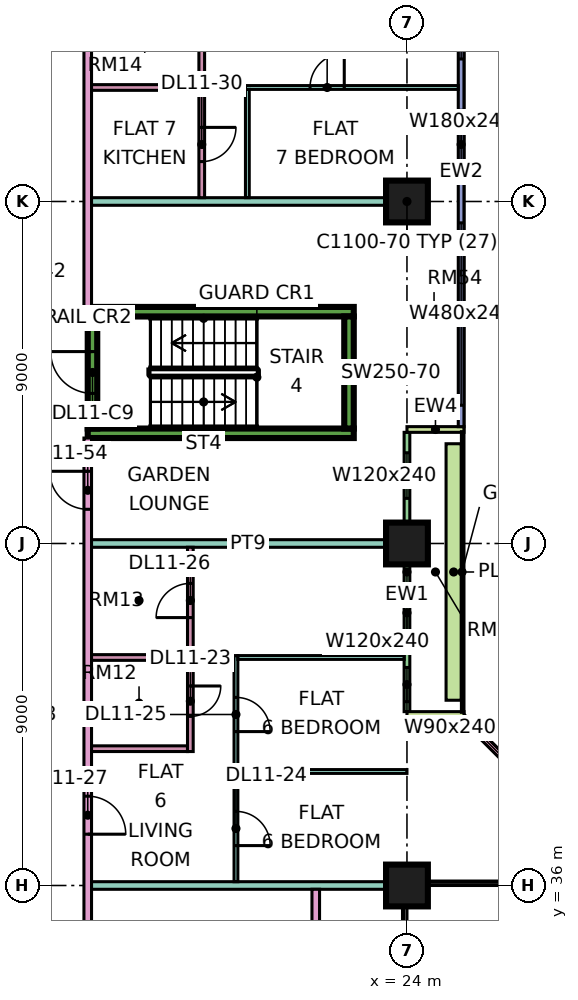
"""IFC4 building model, lengths in metres.
Left out: names, types, materials, properties, quantities, classifications, styles, units other than length and angle.
Written with IfcOpenShell. Run it as: python <this file> out.ifc"""

import sys

from ifc_helpers import new_model, si_unit, direction, frame, frame_2d, origin, origin_2d, place, context, subcontext, project, spatial, rectangle, extrude, element, fill, save


model = new_model("IFC4")
c1 = context("Model", 3, precision=1e-05, world=origin(), true_north=direction((0.0, 1.0)))
c2 = subcontext(c1, "Body", "Model", "MODEL_VIEW")
j1 = project(units=[si_unit("LENGTHUNIT", "METRE"), si_unit("PLANEANGLEUNIT", "RADIAN")], contexts=[c1])
p1 = place(None, origin())
s1 = spatial("IfcSite", under=j1, at=p1, CompositionType="ELEMENT")
p2 = place(p1, origin())
s2 = spatial("IfcBuilding", under=s1, at=p2, CompositionType="ELEMENT")
p3 = place(p2, frame((0.0, 0.0, 56.4)))
s3 = spatial("IfcBuildingStorey", under=s2, at=p3, CompositionType="ELEMENT", Elevation=56.4)
for number, where, z_axis, x_axis in (
    (1, (24.0, 36.0, 0.0), (0.0, 0.0, 1.0), (1.0, 0.0, 0.0)),
    (2, (24.0, 45.0, 0.0), (0.0, 0.0, 1.0), (1.0, 0.0, 0.0)),
    (3, (24.0, 54.0, 0.0), (0.0, 0.0, 1.0), (1.0, 0.0, 0.0)),
):
    element("IfcColumn", number, at=place(p3, frame(where, z_axis=z_axis, x_axis=x_axis)), inside=s3, PredefinedType="COLUMN", context=c2, shape_type="SweptSolid", body=[
        extrude(rectangle(XDim=1.1, YDim=1.1, at=origin_2d()), origin(), (0.0, 0.0, 1.0), 3.75),
    ])
for number, where, z_axis, x_axis in (
    (4, (15.6, 47.9, 0.0), (0.0, 0.0, 1.0), (1.0, 0.0, 0.0)),
    (5, (15.6, 51.1, 0.0), (0.0, 0.0, 1.0), (1.0, 0.0, 0.0)),
):
    element("IfcWall", number, at=place(p3, frame(where, z_axis=z_axis, x_axis=x_axis)), inside=s3, PredefinedType="SHEAR", context=c2, shape_type="SweptSolid", body=[
        extrude(rectangle(XDim=7.0, YDim=0.25, at=frame_2d((3.5, 0.0))), origin(), (0.0, 0.0, 1.0), 3.75),
    ])
p4 = place(p3, frame((15.725, 48.025, 0.0), z_axis=(0.0, 0.0, 1.0), x_axis=(0.0, 1.0, 0.0)))
e6 = element("IfcWall", 6, at=p4, inside=s3, PredefinedType="SHEAR", context=c2, shape_type="SweptSolid", body=[
    extrude(rectangle(XDim=2.95, YDim=0.25, at=frame_2d((1.475, 0.0))), origin(), (0.0, 0.0, 1.0), 3.75),
])
p5 = place(p4, frame((0.925, 0.0, 0.0)))
e7 = element("IfcOpeningElement", 7, at=p5, cuts=e6, PredefinedType="OPENING", context=c2, shape_type="SweptSolid", body=[
    extrude(rectangle(XDim=1.1, YDim=2.2, at=frame_2d((0.55, 1.1))), frame((0.0, 0.135, 0.0), z_axis=(0.0, -1.0, 0.0), x_axis=(1.0, 0.0, 0.0)), (0.0, 0.0, 1.0), 0.27),
])
p6 = place(p3, frame((22.475, 48.025, 0.0), z_axis=(0.0, 0.0, 1.0), x_axis=(0.0, 1.0, 0.0)))
e8 = element("IfcWall", 8, at=p6, inside=s3, PredefinedType="SHEAR", context=c2, shape_type="SweptSolid", body=[
    extrude(rectangle(XDim=2.95, YDim=0.25, at=frame_2d((1.475, 0.0))), origin(), (0.0, 0.0, 1.0), 3.75),
])
p7 = place(p3, frame((28.447, 37.447, 0.0), z_axis=(0.0, 0.0, 1.0), x_axis=(-0.707106781187, 0.707106781187, 0.0)))
e9 = element("IfcWall", 9, at=p7, inside=s3, PredefinedType="SOLIDWALL", context=c2, shape_type="SweptSolid", body=[
    extrude(rectangle(XDim=4.243, YDim=0.15, at=frame_2d((2.121, 0.0))), origin(), (0.0, 0.0, 1.0), 3.35),
])
p8 = place(p7, frame((0.621, 0.0, 0.45)))
e10 = element("IfcOpeningElement", 10, at=p8, cuts=e9, PredefinedType="OPENING", context=c2, shape_type="SweptSolid", body=[
    extrude(rectangle(XDim=3.0, YDim=2.4, at=frame_2d((1.5, 1.2))), frame((0.0, 0.085, 0.0), z_axis=(0.0, -1.0, 0.0), x_axis=(1.0, 0.0, 0.0)), (0.0, 0.0, 1.0), 0.17),
])
p9 = place(p3, frame((24.0, 40.575, 0.0), z_axis=(0.0, 0.0, 1.0), x_axis=(0.0, 1.0, 0.0)))
e11 = element("IfcWall", 11, at=p9, inside=s3, PredefinedType="SOLIDWALL", context=c2, shape_type="SweptSolid", body=[
    extrude(rectangle(XDim=7.35, YDim=0.15, at=frame_2d((3.675, 0.0))), origin(), (0.0, 0.0, 1.0), 3.35),
])
p10 = place(p9, frame((0.262, 0.0, 0.45)))
e12 = element("IfcOpeningElement", 12, at=p10, cuts=e11, PredefinedType="OPENING", context=c2, shape_type="SweptSolid", body=[
    extrude(rectangle(XDim=0.9, YDim=2.4, at=frame_2d((0.45, 1.2))), frame((0.0, 0.085, 0.0), z_axis=(0.0, -1.0, 0.0), x_axis=(1.0, 0.0, 0.0)), (0.0, 0.0, 1.0), 0.17),
])
p11 = place(p9, frame((2.0, 0.0, 0.45)))
e13 = element("IfcOpeningElement", 13, at=p11, cuts=e11, PredefinedType="OPENING", context=c2, shape_type="SweptSolid", body=[
    extrude(rectangle(XDim=1.2, YDim=2.4, at=frame_2d((0.6, 1.2))), frame((0.0, 0.085, 0.0), z_axis=(0.0, -1.0, 0.0), x_axis=(1.0, 0.0, 0.0)), (0.0, 0.0, 1.0), 0.17),
])
p12 = place(p9, frame((5.613, 0.0, 0.45)))
e14 = element("IfcOpeningElement", 14, at=p12, cuts=e11, PredefinedType="OPENING", context=c2, shape_type="SweptSolid", body=[
    extrude(rectangle(XDim=1.2, YDim=2.4, at=frame_2d((0.6, 1.2))), frame((0.0, 0.085, 0.0), z_axis=(0.0, -1.0, 0.0), x_axis=(1.0, 0.0, 0.0)), (0.0, 0.0, 1.0), 0.17),
])
for number, where, z_axis, x_axis in (
    (15, (25.5, 40.5, 0.0), (0.0, 0.0, 1.0), (-1.0, 0.0, 0.0)),
    (16, (25.5, 48.0, 0.0), (0.0, 0.0, 1.0), (-1.0, 0.0, 0.0)),
):
    element("IfcWall", number, at=place(p3, frame(where, z_axis=z_axis, x_axis=x_axis)), inside=s3, PredefinedType="SOLIDWALL", context=c2, shape_type="SweptSolid", body=[
        extrude(rectangle(XDim=1.5, YDim=0.15, at=frame_2d((0.75, 0.0))), origin(), (0.0, 0.0, 1.0), 3.35),
    ])
p13 = place(p3, frame((25.425, 48.075, 0.0), z_axis=(0.0, 0.0, 1.0), x_axis=(0.0, 1.0, 0.0)))
e17 = element("IfcWall", 17, at=p13, inside=s3, PredefinedType="SOLIDWALL", context=c2, shape_type="SweptSolid", body=[
    extrude(rectangle(XDim=13.425, YDim=0.15, at=frame_2d((6.712, 0.0))), origin(), (0.0, 0.0, 1.0), 3.35),
])
p14 = place(p13, frame((0.562, 0.0, 0.45)))
e18 = element("IfcOpeningElement", 18, at=p14, cuts=e17, PredefinedType="OPENING", context=c2, shape_type="SweptSolid", body=[
    extrude(rectangle(XDim=4.8, YDim=2.4, at=frame_2d((2.4, 1.2))), frame((0.0, 0.085, 0.0), z_axis=(0.0, -1.0, 0.0), x_axis=(1.0, 0.0, 0.0)), (0.0, 0.0, 1.0), 0.17),
])
p15 = place(p13, frame((6.525, 0.0, 0.45)))
e19 = element("IfcOpeningElement", 19, at=p15, cuts=e17, PredefinedType="OPENING", context=c2, shape_type="SweptSolid", body=[
    extrude(rectangle(XDim=1.8, YDim=2.4, at=frame_2d((0.9, 1.2))), frame((0.0, 0.085, 0.0), z_axis=(0.0, -1.0, 0.0), x_axis=(1.0, 0.0, 0.0)), (0.0, 0.0, 1.0), 0.17),
])
p16 = place(p13, frame((9.675, 0.0, 0.45)))
e20 = element("IfcOpeningElement", 20, at=p16, cuts=e17, PredefinedType="OPENING", context=c2, shape_type="SweptSolid", body=[
    extrude(rectangle(XDim=3.0, YDim=2.4, at=frame_2d((1.5, 1.2))), frame((0.0, 0.085, 0.0), z_axis=(0.0, -1.0, 0.0), x_axis=(1.0, 0.0, 0.0)), (0.0, 0.0, 1.0), 0.17),
])
p17 = place(p3, frame((25.229, 40.875, 0.0), z_axis=(0.0, 0.0, 1.0), x_axis=(0.0, 1.0, 0.0)))
e21 = element("IfcWall", 21, at=p17, inside=s3, PredefinedType="SOLIDWALL", context=c2, shape_type="SweptSolid", body=[
    extrude(rectangle(XDim=6.75, YDim=0.4, at=frame_2d((3.375, 0.0))), origin(), (0.0, 0.0, 1.0), 0.7),
])
p18 = place(p3, frame((15.6, 20.0, 0.0), z_axis=(0.0, 0.0, 1.0), x_axis=(0.0, 1.0, 0.0)))
e22 = element("IfcWall", 22, at=p18, inside=s3, PredefinedType="PARTITIONING", context=c2, shape_type="SweptSolid", body=[
    extrude(rectangle(XDim=27.775, YDim=0.2, at=frame_2d((13.887, 0.0))), origin(), (0.0, 0.0, 1.0), 3.35),
])
p19 = place(p18, frame((7.0, 0.0, 0.0)))
e23 = element("IfcOpeningElement", 23, at=p19, cuts=e22, PredefinedType="OPENING", context=c2, shape_type="SweptSolid", body=[
    extrude(rectangle(XDim=1.0, YDim=2.1, at=frame_2d((0.5, 1.05))), frame((0.0, 0.11, 0.0), z_axis=(0.0, -1.0, 0.0), x_axis=(1.0, 0.0, 0.0)), (0.0, 0.0, 1.0), 0.22),
])
p20 = place(p18, frame((12.95, 0.0, 0.0)))
e24 = element("IfcOpeningElement", 24, at=p20, cuts=e22, PredefinedType="OPENING", context=c2, shape_type="SweptSolid", body=[
    extrude(rectangle(XDim=1.0, YDim=2.1, at=frame_2d((0.5, 1.05))), frame((0.0, 0.11, 0.0), z_axis=(0.0, -1.0, 0.0), x_axis=(1.0, 0.0, 0.0)), (0.0, 0.0, 1.0), 0.22),
])
p21 = place(p18, frame((17.35, 0.0, 0.0)))
e25 = element("IfcOpeningElement", 25, at=p21, cuts=e22, PredefinedType="OPENING", context=c2, shape_type="SweptSolid", body=[
    extrude(rectangle(XDim=1.0, YDim=2.1, at=frame_2d((0.5, 1.05))), frame((0.0, 0.11, 0.0), z_axis=(0.0, -1.0, 0.0), x_axis=(1.0, 0.0, 0.0)), (0.0, 0.0, 1.0), 0.22),
])
p22 = place(p18, frame((1.15, 0.0, 0.0)))
e26 = element("IfcOpeningElement", 26, at=p22, cuts=e22, PredefinedType="OPENING", context=c2, shape_type="SweptSolid", body=[
    extrude(rectangle(XDim=1.8, YDim=2.1, at=frame_2d((0.9, 1.05))), frame((0.0, 0.11, 0.0), z_axis=(0.0, -1.0, 0.0), x_axis=(1.0, 0.0, 0.0)), (0.0, 0.0, 1.0), 0.22),
])
p23 = place(p18, frame((25.9, 0.0, 0.0)))
e27 = element("IfcOpeningElement", 27, at=p23, cuts=e22, PredefinedType="OPENING", context=c2, shape_type="SweptSolid", body=[
    extrude(rectangle(XDim=1.0, YDim=2.1, at=frame_2d((0.5, 1.05))), frame((0.0, 0.11, 0.0), z_axis=(0.0, -1.0, 0.0), x_axis=(1.0, 0.0, 0.0)), (0.0, 0.0, 1.0), 0.22),
])
p24 = place(p3, frame((15.6, 51.225, 0.0), z_axis=(0.0, 0.0, 1.0), x_axis=(0.0, 1.0, 0.0)))
e28 = element("IfcWall", 28, at=p24, inside=s3, PredefinedType="PARTITIONING", context=c2, shape_type="SweptSolid", body=[
    extrude(rectangle(XDim=11.701, YDim=0.2, at=frame_2d((5.851, 0.0))), origin(), (0.0, 0.0, 1.0), 3.35),
])
p25 = place(p24, frame((9.675, 0.0, 0.0)))
e29 = element("IfcOpeningElement", 29, at=p25, cuts=e28, PredefinedType="OPENING", context=c2, shape_type="SweptSolid", body=[
    extrude(rectangle(XDim=1.0, YDim=2.1, at=frame_2d((0.5, 1.05))), frame((0.0, 0.11, 0.0), z_axis=(0.0, -1.0, 0.0), x_axis=(1.0, 0.0, 0.0)), (0.0, 0.0, 1.0), 0.22),
])
p26 = place(p3, frame((15.7, 36.0, 0.0), z_axis=(0.0, 0.0, 1.0), x_axis=(1.0, 0.0, 0.0)))
e30 = element("IfcWall", 30, at=p26, inside=s3, PredefinedType="PARTITIONING", context=c2, shape_type="SweptSolid", body=[
    extrude(rectangle(XDim=8.3, YDim=0.2, at=frame_2d((4.15, 0.0))), origin(), (0.0, 0.0, 1.0), 3.35),
])
for number, where, z_axis, x_axis in (
    (31, (15.7, 39.6, 0.0), (0.0, 0.0, 1.0), (1.0, 0.0, 0.0)),
    (32, (15.7, 42.0, 0.0), (0.0, 0.0, 1.0), (1.0, 0.0, 0.0)),
):
    element("IfcWall", number, at=place(p3, frame(where, z_axis=z_axis, x_axis=x_axis)), inside=s3, PredefinedType="PARTITIONING", context=c2, shape_type="SweptSolid", body=[
        extrude(rectangle(XDim=2.525, YDim=0.15, at=frame_2d((1.263, 0.0))), origin(), (0.0, 0.0, 1.0), 3.35),
    ])
p27 = place(p3, frame((15.7, 45.0, 0.0), z_axis=(0.0, 0.0, 1.0), x_axis=(1.0, 0.0, 0.0)))
e33 = element("IfcWall", 33, at=p27, inside=s3, PredefinedType="PARTITIONING", context=c2, shape_type="SweptSolid", body=[
    extrude(rectangle(XDim=8.226, YDim=0.2, at=frame_2d((4.113, 0.0))), origin(), (0.0, 0.0, 1.0), 3.35),
])
p28 = place(p3, frame((15.7, 54.0, 0.0), z_axis=(0.0, 0.0, 1.0), x_axis=(1.0, 0.0, 0.0)))
e34 = element("IfcWall", 34, at=p28, inside=s3, PredefinedType="PARTITIONING", context=c2, shape_type="SweptSolid", body=[
    extrude(rectangle(XDim=8.3, YDim=0.2, at=frame_2d((4.15, 0.0))), origin(), (0.0, 0.0, 1.0), 3.35),
])
p29 = place(p3, frame((15.7, 57.0, 0.0), z_axis=(0.0, 0.0, 1.0), x_axis=(1.0, 0.0, 0.0)))
e35 = element("IfcWall", 35, at=p29, inside=s3, PredefinedType="PARTITIONING", context=c2, shape_type="SweptSolid", body=[
    extrude(rectangle(XDim=2.825, YDim=0.15, at=frame_2d((1.413, 0.0))), origin(), (0.0, 0.0, 1.0), 3.35),
])
p30 = place(p3, frame((18.3, 39.525, 0.0), z_axis=(0.0, 0.0, 1.0), x_axis=(0.0, 1.0, 0.0)))
e36 = element("IfcWall", 36, at=p30, inside=s3, PredefinedType="PARTITIONING", context=c2, shape_type="SweptSolid", body=[
    extrude(rectangle(XDim=5.375, YDim=0.15, at=frame_2d((2.688, 0.0))), origin(), (0.0, 0.0, 1.0), 3.35),
])
p31 = place(p30, frame((0.925, 0.0, 0.0)))
e37 = element("IfcOpeningElement", 37, at=p31, cuts=e36, PredefinedType="OPENING", context=c2, shape_type="SweptSolid", body=[
    extrude(rectangle(XDim=0.8, YDim=2.1, at=frame_2d((0.4, 1.05))), frame((0.0, 0.085, 0.0), z_axis=(0.0, -1.0, 0.0), x_axis=(1.0, 0.0, 0.0)), (0.0, 0.0, 1.0), 0.17),
])
p32 = place(p30, frame((3.525, 0.0, 0.0)))
e38 = element("IfcOpeningElement", 38, at=p32, cuts=e36, PredefinedType="OPENING", context=c2, shape_type="SweptSolid", body=[
    extrude(rectangle(XDim=0.9, YDim=2.1, at=frame_2d((0.45, 1.05))), frame((0.0, 0.085, 0.0), z_axis=(0.0, -1.0, 0.0), x_axis=(1.0, 0.0, 0.0)), (0.0, 0.0, 1.0), 0.17),
])
p33 = place(p3, frame((18.6, 54.1, 0.0), z_axis=(0.0, 0.0, 1.0), x_axis=(0.0, 1.0, 0.0)))
e39 = element("IfcWall", 39, at=p33, inside=s3, PredefinedType="PARTITIONING", context=c2, shape_type="SweptSolid", body=[
    extrude(rectangle(XDim=5.675, YDim=0.15, at=frame_2d((2.837, 0.0))), origin(), (0.0, 0.0, 1.0), 3.35),
])
p34 = place(p33, frame((0.95, 0.0, 0.0)))
e40 = element("IfcOpeningElement", 40, at=p34, cuts=e39, PredefinedType="OPENING", context=c2, shape_type="SweptSolid", body=[
    extrude(rectangle(XDim=0.9, YDim=2.1, at=frame_2d((0.45, 1.05))), frame((0.0, 0.085, 0.0), z_axis=(0.0, -1.0, 0.0), x_axis=(1.0, 0.0, 0.0)), (0.0, 0.0, 1.0), 0.17),
])
p35 = place(p3, frame((19.5, 36.1, 0.0), z_axis=(0.0, 0.0, 1.0), x_axis=(0.0, 1.0, 0.0)))
e41 = element("IfcWall", 41, at=p35, inside=s3, PredefinedType="PARTITIONING", context=c2, shape_type="SweptSolid", body=[
    extrude(rectangle(XDim=5.95, YDim=0.1, at=frame_2d((2.975, 0.0))), origin(), (0.0, 0.0, 1.0), 3.35),
])
p36 = place(p35, frame((0.95, 0.0, 0.0)))
e42 = element("IfcOpeningElement", 42, at=p36, cuts=e41, PredefinedType="OPENING", context=c2, shape_type="SweptSolid", body=[
    extrude(rectangle(XDim=0.9, YDim=2.1, at=frame_2d((0.45, 1.05))), frame((0.0, 0.06, 0.0), z_axis=(0.0, -1.0, 0.0), x_axis=(1.0, 0.0, 0.0)), (0.0, 0.0, 1.0), 0.12),
])
p37 = place(p35, frame((3.95, 0.0, 0.0)))
e43 = element("IfcOpeningElement", 43, at=p37, cuts=e41, PredefinedType="OPENING", context=c2, shape_type="SweptSolid", body=[
    extrude(rectangle(XDim=0.9, YDim=2.1, at=frame_2d((0.45, 1.05))), frame((0.0, 0.06, 0.0), z_axis=(0.0, -1.0, 0.0), x_axis=(1.0, 0.0, 0.0)), (0.0, 0.0, 1.0), 0.12),
])
p38 = place(p3, frame((19.55, 39.0, 0.0), z_axis=(0.0, 0.0, 1.0), x_axis=(1.0, 0.0, 0.0)))
e44 = element("IfcWall", 44, at=p38, inside=s3, PredefinedType="PARTITIONING", context=c2, shape_type="SweptSolid", body=[
    extrude(rectangle(XDim=4.45, YDim=0.1, at=frame_2d((2.225, 0.0))), origin(), (0.0, 0.0, 1.0), 3.35),
])
p39 = place(p3, frame((19.55, 42.0, 0.0), z_axis=(0.0, 0.0, 1.0), x_axis=(1.0, 0.0, 0.0)))
e45 = element("IfcWall", 45, at=p39, inside=s3, PredefinedType="PARTITIONING", context=c2, shape_type="SweptSolid", body=[
    extrude(rectangle(XDim=4.376, YDim=0.1, at=frame_2d((2.188, 0.0))), origin(), (0.0, 0.0, 1.0), 3.35),
])
p40 = place(p3, frame((19.75, 57.0, 0.0), z_axis=(0.0, 0.0, 1.0), x_axis=(1.0, 0.0, 0.0)))
e46 = element("IfcWall", 46, at=p40, inside=s3, PredefinedType="PARTITIONING", context=c2, shape_type="SweptSolid", body=[
    extrude(rectangle(XDim=5.6, YDim=0.1, at=frame_2d((2.8, 0.0))), origin(), (0.0, 0.0, 1.0), 3.35),
])
p41 = place(p40, frame((1.7, 0.0, 0.0)))
e47 = element("IfcOpeningElement", 47, at=p41, cuts=e46, PredefinedType="OPENING", context=c2, shape_type="SweptSolid", body=[
    extrude(rectangle(XDim=0.9, YDim=2.1, at=frame_2d((0.45, 1.05))), frame((0.0, 0.06, 0.0), z_axis=(0.0, -1.0, 0.0), x_axis=(1.0, 0.0, 0.0)), (0.0, 0.0, 1.0), 0.12),
])
p42 = place(p3, frame((19.8, 54.1, 0.0), z_axis=(0.0, 0.0, 1.0), x_axis=(0.0, 1.0, 0.0)))
e48 = element("IfcWall", 48, at=p42, inside=s3, PredefinedType="PARTITIONING", context=c2, shape_type="SweptSolid", body=[
    extrude(rectangle(XDim=2.85, YDim=0.1, at=frame_2d((1.425, 0.0))), origin(), (0.0, 0.0, 1.0), 3.35),
])
p43 = place(p3, frame((21.6, 23.9, 0.0), z_axis=(0.0, 0.0, 1.0), x_axis=(0.0, 1.0, 0.0)))
e49 = element("IfcWall", 49, at=p43, inside=s3, PredefinedType="PARTITIONING", context=c2, shape_type="SweptSolid", body=[
    extrude(rectangle(XDim=12.0, YDim=0.2, at=frame_2d((6.0, 0.0))), origin(), (0.0, 0.0, 1.0), 3.35),
])
p44 = place(p8, origin())
e50 = element("IfcWindow", 50, at=p44, inside=s3, PartitioningType="SINGLE_PANEL", PredefinedType="WINDOW", context=c2, shape_type="SweptSolid", body=[
    extrude(rectangle(XDim=3.0, YDim=2.4, at=frame_2d((1.5, 1.2))), frame((0.0, 0.03, 0.0), z_axis=(0.0, -1.0, 0.0), x_axis=(1.0, 0.0, 0.0)), (0.0, 0.0, 1.0), 0.06),
])
fill(e10, e50)
p45 = place(p10, origin())
e51 = element("IfcWindow", 51, at=p45, inside=s3, PartitioningType="SINGLE_PANEL", PredefinedType="WINDOW", context=c2, shape_type="SweptSolid", body=[
    extrude(rectangle(XDim=0.9, YDim=2.4, at=frame_2d((0.45, 1.2))), frame((0.0, 0.03, 0.0), z_axis=(0.0, -1.0, 0.0), x_axis=(1.0, 0.0, 0.0)), (0.0, 0.0, 1.0), 0.06),
])
fill(e12, e51)
p46 = place(p11, origin())
e52 = element("IfcWindow", 52, at=p46, inside=s3, PartitioningType="SINGLE_PANEL", PredefinedType="WINDOW", context=c2, shape_type="SweptSolid", body=[
    extrude(rectangle(XDim=1.2, YDim=2.4, at=frame_2d((0.6, 1.2))), frame((0.0, 0.03, 0.0), z_axis=(0.0, -1.0, 0.0), x_axis=(1.0, 0.0, 0.0)), (0.0, 0.0, 1.0), 0.06),
])
fill(e13, e52)
p47 = place(p12, origin())
e53 = element("IfcWindow", 53, at=p47, inside=s3, PartitioningType="SINGLE_PANEL", PredefinedType="WINDOW", context=c2, shape_type="SweptSolid", body=[
    extrude(rectangle(XDim=1.2, YDim=2.4, at=frame_2d((0.6, 1.2))), frame((0.0, 0.03, 0.0), z_axis=(0.0, -1.0, 0.0), x_axis=(1.0, 0.0, 0.0)), (0.0, 0.0, 1.0), 0.06),
])
fill(e14, e53)
p48 = place(p14, origin())
e54 = element("IfcWindow", 54, at=p48, inside=s3, PartitioningType="SINGLE_PANEL", PredefinedType="WINDOW", context=c2, shape_type="SweptSolid", body=[
    extrude(rectangle(XDim=4.8, YDim=2.4, at=frame_2d((2.4, 1.2))), frame((0.0, 0.03, 0.0), z_axis=(0.0, -1.0, 0.0), x_axis=(1.0, 0.0, 0.0)), (0.0, 0.0, 1.0), 0.06),
])
fill(e18, e54)
p49 = place(p15, origin())
e55 = element("IfcWindow", 55, at=p49, inside=s3, PartitioningType="SINGLE_PANEL", PredefinedType="WINDOW", context=c2, shape_type="SweptSolid", body=[
    extrude(rectangle(XDim=1.8, YDim=2.4, at=frame_2d((0.9, 1.2))), frame((0.0, 0.03, 0.0), z_axis=(0.0, -1.0, 0.0), x_axis=(1.0, 0.0, 0.0)), (0.0, 0.0, 1.0), 0.06),
])
fill(e19, e55)
p50 = place(p16, origin())
e56 = element("IfcWindow", 56, at=p50, inside=s3, PartitioningType="SINGLE_PANEL", PredefinedType="WINDOW", context=c2, shape_type="SweptSolid", body=[
    extrude(rectangle(XDim=3.0, YDim=2.4, at=frame_2d((1.5, 1.2))), frame((0.0, 0.03, 0.0), z_axis=(0.0, -1.0, 0.0), x_axis=(1.0, 0.0, 0.0)), (0.0, 0.0, 1.0), 0.06),
])
fill(e20, e56)
p51 = place(p5, frame((1.1, 0.0, 0.0), z_axis=(0.0, 0.0, 1.0), x_axis=(-1.0, 0.0, 0.0)))
e57 = element("IfcDoor", 57, at=p51, inside=s3, OperationType="SINGLE_SWING_RIGHT", PredefinedType="DOOR", context=c2, shape_type="SweptSolid", body=[
    extrude(rectangle(XDim=1.1, YDim=2.2, at=frame_2d((0.55, 1.1))), frame((0.0, 0.025, 0.0), z_axis=(0.0, -1.0, 0.0), x_axis=(1.0, 0.0, 0.0)), (0.0, 0.0, 1.0), 0.05),
])
fill(e7, e57)
p52 = place(p31, origin())
e58 = element("IfcDoor", 58, at=p52, inside=s3, OperationType="SINGLE_SWING_RIGHT", PredefinedType="DOOR", context=c2, shape_type="SweptSolid", body=[
    extrude(rectangle(XDim=0.8, YDim=2.1, at=frame_2d((0.4, 1.05))), frame((0.0, 0.025, 0.0), z_axis=(0.0, -1.0, 0.0), x_axis=(1.0, 0.0, 0.0)), (0.0, 0.0, 1.0), 0.05),
])
fill(e37, e58)
p53 = place(p36, frame((0.9, 0.0, 0.0), z_axis=(0.0, 0.0, 1.0), x_axis=(-1.0, 0.0, 0.0)))
e59 = element("IfcDoor", 59, at=p53, inside=s3, OperationType="SINGLE_SWING_LEFT", PredefinedType="DOOR", context=c2, shape_type="SweptSolid", body=[
    extrude(rectangle(XDim=0.9, YDim=2.1, at=frame_2d((0.45, 1.05))), frame((0.0, 0.025, 0.0), z_axis=(0.0, -1.0, 0.0), x_axis=(1.0, 0.0, 0.0)), (0.0, 0.0, 1.0), 0.05),
])
fill(e42, e59)
p54 = place(p37, frame((0.9, 0.0, 0.0), z_axis=(0.0, 0.0, 1.0), x_axis=(-1.0, 0.0, 0.0)))
e60 = element("IfcDoor", 60, at=p54, inside=s3, OperationType="SINGLE_SWING_LEFT", PredefinedType="DOOR", context=c2, shape_type="SweptSolid", body=[
    extrude(rectangle(XDim=0.9, YDim=2.1, at=frame_2d((0.45, 1.05))), frame((0.0, 0.025, 0.0), z_axis=(0.0, -1.0, 0.0), x_axis=(1.0, 0.0, 0.0)), (0.0, 0.0, 1.0), 0.05),
])
fill(e43, e60)
p55 = place(p32, origin())
e61 = element("IfcDoor", 61, at=p55, inside=s3, OperationType="SINGLE_SWING_LEFT", PredefinedType="DOOR", context=c2, shape_type="SweptSolid", body=[
    extrude(rectangle(XDim=0.9, YDim=2.1, at=frame_2d((0.45, 1.05))), frame((0.0, 0.025, 0.0), z_axis=(0.0, -1.0, 0.0), x_axis=(1.0, 0.0, 0.0)), (0.0, 0.0, 1.0), 0.05),
])
fill(e38, e61)
p56 = place(p21, frame((1.0, 0.0, 0.0), z_axis=(0.0, 0.0, 1.0), x_axis=(-1.0, 0.0, 0.0)))
e62 = element("IfcDoor", 62, at=p56, inside=s3, OperationType="SINGLE_SWING_LEFT", PredefinedType="DOOR", context=c2, shape_type="SweptSolid", body=[
    extrude(rectangle(XDim=1.0, YDim=2.1, at=frame_2d((0.5, 1.05))), frame((0.0, 0.025, 0.0), z_axis=(0.0, -1.0, 0.0), x_axis=(1.0, 0.0, 0.0)), (0.0, 0.0, 1.0), 0.05),
])
fill(e25, e62)
p57 = place(p41, frame((0.9, 0.0, 0.0), z_axis=(0.0, 0.0, 1.0), x_axis=(-1.0, 0.0, 0.0)))
e63 = element("IfcDoor", 63, at=p57, inside=s3, OperationType="SINGLE_SWING_RIGHT", PredefinedType="DOOR", context=c2, shape_type="SweptSolid", body=[
    extrude(rectangle(XDim=0.9, YDim=2.1, at=frame_2d((0.45, 1.05))), frame((0.0, 0.025, 0.0), z_axis=(0.0, -1.0, 0.0), x_axis=(1.0, 0.0, 0.0)), (0.0, 0.0, 1.0), 0.05),
])
fill(e47, e63)
p58 = place(p34, origin())
e64 = element("IfcDoor", 64, at=p58, inside=s3, OperationType="SINGLE_SWING_RIGHT", PredefinedType="DOOR", context=c2, shape_type="SweptSolid", body=[
    extrude(rectangle(XDim=0.9, YDim=2.1, at=frame_2d((0.45, 1.05))), frame((0.0, 0.025, 0.0), z_axis=(0.0, -1.0, 0.0), x_axis=(1.0, 0.0, 0.0)), (0.0, 0.0, 1.0), 0.05),
])
fill(e40, e64)
p59 = place(p23, frame((1.0, 0.0, 0.0), z_axis=(0.0, 0.0, 1.0), x_axis=(-1.0, 0.0, 0.0)))
e65 = element("IfcDoor", 65, at=p59, inside=s3, OperationType="SINGLE_SWING_RIGHT", PredefinedType="DOOR", context=c2, shape_type="SweptSolid", body=[
    extrude(rectangle(XDim=1.0, YDim=2.1, at=frame_2d((0.5, 1.05))), frame((0.0, 0.025, 0.0), z_axis=(0.0, -1.0, 0.0), x_axis=(1.0, 0.0, 0.0)), (0.0, 0.0, 1.0), 0.05),
])
fill(e27, e65)
save(model, sys.argv[1])
